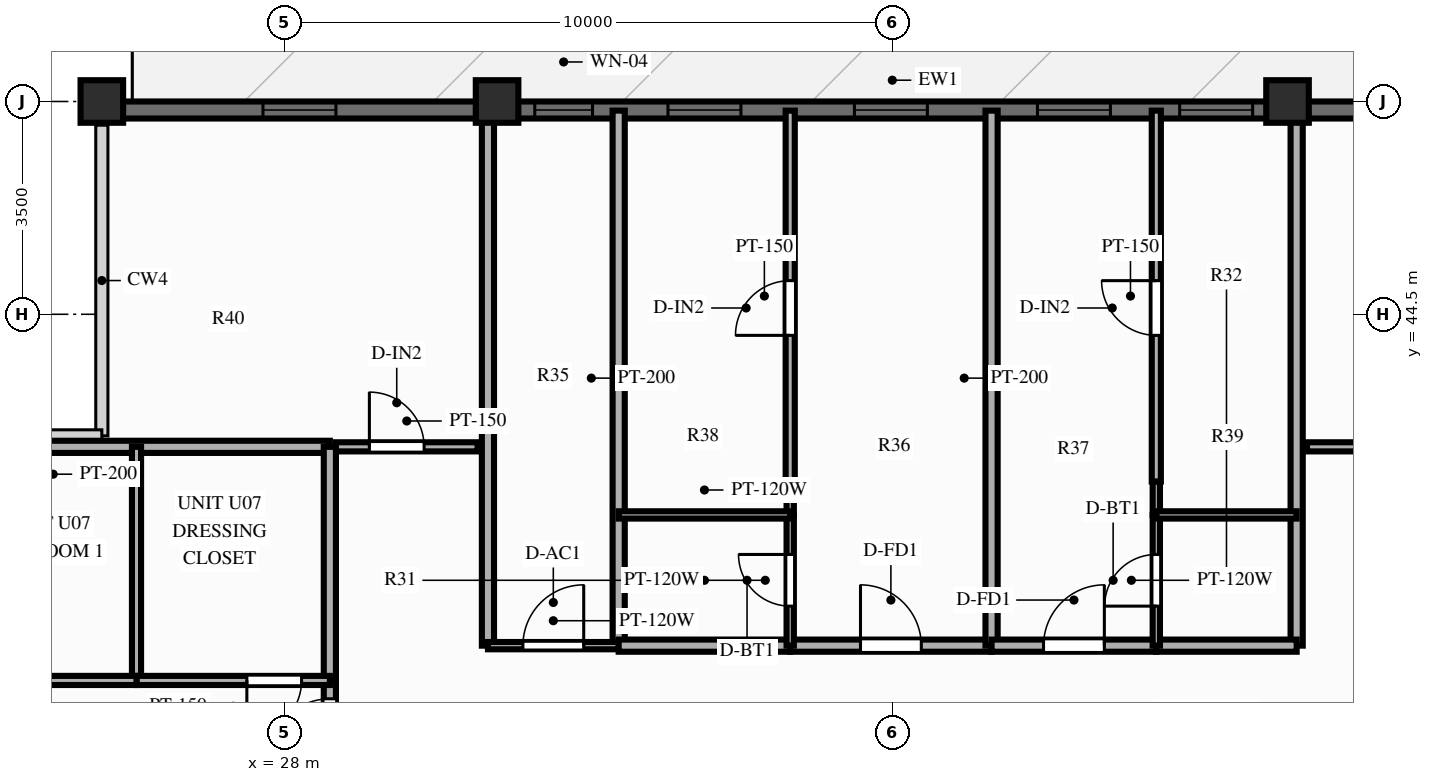
"""IFC4 building model, lengths in metres.
Left out: names, types, materials, properties, quantities, classifications, styles, units other than length and angle.
Written with IfcOpenShell. Run it as: python <this file> out.ifc"""

import sys

from ifc_helpers import new_model, si_unit, direction, frame, frame_2d, origin, origin_2d, place, context, subcontext, project, spatial, rectangle, extrude, source, transform, mapped, element, fill, save


model = new_model("IFC4")
c1 = context("Model", 3, precision=1e-05, world=origin(), true_north=direction((0.0, 1.0)))
c2 = subcontext(c1, "Body", "Model", "MODEL_VIEW")
j1 = project(units=[si_unit("LENGTHUNIT", "METRE"), si_unit("PLANEANGLEUNIT", "RADIAN")], contexts=[c1])
p1 = place(None, origin())
s1 = spatial("IfcSite", under=j1, at=p1, CompositionType="ELEMENT")
p2 = place(p1, origin())
s2 = spatial("IfcBuilding", under=s1, at=p2, CompositionType="ELEMENT")
p3 = place(p2, frame((0.0, 0.0, 216.3)))
s3 = spatial("IfcBuildingStorey", under=s2, at=p3, CompositionType="ELEMENT", Elevation=216.3)
m1 = source(origin(), c2, "Body", "SweptSolid", [
    extrude(rectangle(XDim=0.7, YDim=0.7, at=origin_2d()), origin(), (0.0, 0.0, 1.0), 3.9),
])
for number, where, z_axis, x_axis in (
    (1, (44.5, 48.0, 0.0), (0.0, 0.0, 1.0), (1.0, 0.0, 0.0)),
    (2, (31.5, 48.0, 0.0), (0.0, 0.0, 1.0), (1.0, 0.0, 0.0)),
    (3, (25.0, 48.0, 0.0), (0.0, 0.0, 1.0), (1.0, 0.0, 0.0)),
):
    element("IfcColumn", number, at=place(p3, frame(where, z_axis=z_axis, x_axis=x_axis)), inside=s3, PredefinedType="COLUMN", context=c2, shape_type="MappedRepresentation", body=[
        mapped(m1, transform((0.0, 0.0, 0.0), scale=1.0)),
    ])
p4 = place(p3, frame((25.0, 47.86, 0.0), z_axis=(0.0, 0.0, 1.0), x_axis=(1.0, 0.0, 0.0)))
e4 = element("IfcWall", 4, at=p4, inside=s3, PredefinedType="SOLIDWALL", context=c2, shape_type="SweptSolid", body=[
    extrude(rectangle(XDim=26.0, YDim=0.28, at=frame_2d((13.0, 0.0))), origin(), (0.0, 0.0, 1.0), 2.44),
])
p5 = place(p4, frame((2.65, 0.0, 0.25)))
e5 = element("IfcOpeningElement", 5, at=p5, cuts=e4, PredefinedType="OPENING", context=c2, shape_type="SweptSolid", body=[
    extrude(rectangle(XDim=1.2, YDim=1.5, at=frame_2d((0.6, 0.75))), frame((0.0, 0.152, 0.0), z_axis=(0.0, -1.0, 0.0), x_axis=(1.0, 0.0, 0.0)), (0.0, 0.0, 1.0), 0.304),
])
p6 = place(p4, frame((7.12, 0.0, 0.25)))
e6 = element("IfcOpeningElement", 6, at=p6, cuts=e4, PredefinedType="OPENING", context=c2, shape_type="SweptSolid", body=[
    extrude(rectangle(XDim=0.95, YDim=1.5, at=frame_2d((0.475, 0.75))), frame((0.0, 0.152, 0.0), z_axis=(0.0, -1.0, 0.0), x_axis=(1.0, 0.0, 0.0)), (0.0, 0.0, 1.0), 0.304),
])
p7 = place(p4, frame((9.311, 0.0, 0.25)))
e7 = element("IfcOpeningElement", 7, at=p7, cuts=e4, PredefinedType="OPENING", context=c2, shape_type="SweptSolid", body=[
    extrude(rectangle(XDim=1.2, YDim=1.5, at=frame_2d((0.6, 0.75))), frame((0.0, 0.152, 0.0), z_axis=(0.0, -1.0, 0.0), x_axis=(1.0, 0.0, 0.0)), (0.0, 0.0, 1.0), 0.304),
])
p8 = place(p4, frame((12.377, 0.0, 0.25)))
e8 = element("IfcOpeningElement", 8, at=p8, cuts=e4, PredefinedType="OPENING", context=c2, shape_type="SweptSolid", body=[
    extrude(rectangle(XDim=1.2, YDim=1.5, at=frame_2d((0.6, 0.75))), frame((0.0, 0.152, 0.0), z_axis=(0.0, -1.0, 0.0), x_axis=(1.0, 0.0, 0.0)), (0.0, 0.0, 1.0), 0.304),
])
p9 = place(p4, frame((15.387, 0.0, 0.25)))
e9 = element("IfcOpeningElement", 9, at=p9, cuts=e4, PredefinedType="OPENING", context=c2, shape_type="SweptSolid", body=[
    extrude(rectangle(XDim=1.2, YDim=1.5, at=frame_2d((0.6, 0.75))), frame((0.0, 0.152, 0.0), z_axis=(0.0, -1.0, 0.0), x_axis=(1.0, 0.0, 0.0)), (0.0, 0.0, 1.0), 0.304),
])
p10 = place(p4, frame((17.726, 0.0, 0.25)))
e10 = element("IfcOpeningElement", 10, at=p10, cuts=e4, PredefinedType="OPENING", context=c2, shape_type="SweptSolid", body=[
    extrude(rectangle(XDim=1.2, YDim=1.5, at=frame_2d((0.6, 0.75))), frame((0.0, 0.152, 0.0), z_axis=(0.0, -1.0, 0.0), x_axis=(1.0, 0.0, 0.0)), (0.0, 0.0, 1.0), 0.304),
])
p11 = place(p4, frame((22.2, 0.0, 0.0)))
e11 = element("IfcOpeningElement", 11, at=p11, cuts=e4, PredefinedType="OPENING", context=c2, shape_type="SweptSolid", body=[
    extrude(rectangle(XDim=1.1, YDim=2.15, at=frame_2d((0.55, 1.075))), frame((0.0, 0.152, 0.0), z_axis=(0.0, -1.0, 0.0), x_axis=(1.0, 0.0, 0.0)), (0.0, 0.0, 1.0), 0.304),
])
p12 = place(p3, frame((28.85, 42.32, 0.0), z_axis=(0.0, 0.0, 1.0), x_axis=(1.0, 0.0, 0.0)))
e12 = element("IfcWall", 12, at=p12, inside=s3, PredefinedType="PARTITIONING", context=c2, shape_type="SweptSolid", body=[
    extrude(rectangle(XDim=2.33, YDim=0.15, at=frame_2d((1.165, 0.0))), origin(), (0.0, 0.0, 1.0), 2.24),
])
p13 = place(p12, frame((0.55, 0.0, 0.0)))
e13 = element("IfcOpeningElement", 13, at=p13, cuts=e12, PredefinedType="OPENING", context=c2, shape_type="SweptSolid", body=[
    extrude(rectangle(XDim=0.9, YDim=2.1, at=frame_2d((0.45, 1.05))), frame((0.0, 0.087, 0.0), z_axis=(0.0, -1.0, 0.0), x_axis=(1.0, 0.0, 0.0)), (0.0, 0.0, 1.0), 0.174),
])
p14 = place(p3, frame((44.82, 42.32, 0.0), z_axis=(0.0, 0.0, 1.0), x_axis=(1.0, 0.0, 0.0)))
e14 = element("IfcWall", 14, at=p14, inside=s3, PredefinedType="PARTITIONING", context=c2, shape_type="SweptSolid", body=[
    extrude(rectangle(XDim=2.33, YDim=0.15, at=frame_2d((1.165, 0.0))), origin(), (0.0, 0.0, 1.0), 2.24),
])
p15 = place(p14, frame((0.88, 0.0, 0.0)))
e15 = element("IfcOpeningElement", 15, at=p15, cuts=e14, PredefinedType="OPENING", context=c2, shape_type="SweptSolid", body=[
    extrude(rectangle(XDim=0.9, YDim=2.1, at=frame_2d((0.45, 1.05))), frame((0.0, 0.087, 0.0), z_axis=(0.0, -1.0, 0.0), x_axis=(1.0, 0.0, 0.0)), (0.0, 0.0, 1.0), 0.174),
])
for number, where, z_axis, x_axis in (
    (16, (31.35, 39.05, 0.0), (0.0, 0.0, 1.0), (0.0, 1.0, 0.0)),
    (17, (44.65, 39.05, 0.0), (0.0, 0.0, 1.0), (0.0, 1.0, 0.0)),
):
    element("IfcWall", number, at=place(p3, frame(where, z_axis=z_axis, x_axis=x_axis)), inside=s3, PredefinedType="PARTITIONING", context=c2, shape_type="SweptSolid", body=[
        extrude(rectangle(XDim=8.8, YDim=0.2, at=frame_2d((4.4, 0.0))), origin(), (0.0, 0.0, 1.0), 2.44),
    ])
p16 = place(p3, frame((33.5, 39.05, 0.0), z_axis=(0.0, 0.0, 1.0), x_axis=(0.0, 1.0, 0.0)))
e18 = element("IfcWall", 18, at=p16, inside=s3, PredefinedType="PARTITIONING", context=c2, shape_type="SweptSolid", body=[
    extrude(rectangle(XDim=8.8, YDim=0.2, at=frame_2d((4.4, 0.0))), origin(), (0.0, 0.0, 1.0), 3.56),
])
p17 = place(p3, frame((31.35, 39.05, 0.0), z_axis=(0.0, 0.0, 1.0), x_axis=(1.0, 0.0, 0.0)))
e19 = element("IfcWall", 19, at=p17, inside=s3, PredefinedType="PARTITIONING", context=c2, shape_type="SweptSolid", body=[
    extrude(rectangle(XDim=2.15, YDim=0.12, at=frame_2d((1.075, 0.0))), origin(), (0.0, 0.0, 1.0), 3.56),
])
p18 = place(p17, frame((0.575, 0.0, 0.0)))
e20 = element("IfcOpeningElement", 20, at=p18, cuts=e19, PredefinedType="OPENING", context=c2, shape_type="SweptSolid", body=[
    extrude(rectangle(XDim=1.0, YDim=2.1, at=frame_2d((0.5, 1.05))), frame((0.0, 0.072, 0.0), z_axis=(0.0, -1.0, 0.0), x_axis=(1.0, 0.0, 0.0)), (0.0, 0.0, 1.0), 0.144),
])
p19 = place(p3, frame((33.5, 39.05, 0.0), z_axis=(0.0, 0.0, 1.0), x_axis=(1.0, 0.0, 0.0)))
e21 = element("IfcWall", 21, at=p19, inside=s3, PredefinedType="PARTITIONING", context=c2, shape_type="SweptSolid", body=[
    extrude(rectangle(XDim=2.821, YDim=0.2, at=frame_2d((1.411, 0.0))), origin(), (0.0, 0.0, 1.0), 3.56),
])
p20 = place(p3, frame((36.321, 39.05, 0.0), z_axis=(0.0, 0.0, 1.0), x_axis=(1.0, 0.0, 0.0)))
e22 = element("IfcWall", 22, at=p20, inside=s3, PredefinedType="PARTITIONING", context=c2, shape_type="SweptSolid", body=[
    extrude(rectangle(XDim=3.312, YDim=0.2, at=frame_2d((1.656, 0.0))), origin(), (0.0, 0.0, 1.0), 3.56),
])
p21 = place(p20, frame((1.156, 0.0, 0.0)))
e23 = element("IfcOpeningElement", 23, at=p21, cuts=e22, PredefinedType="OPENING", context=c2, shape_type="SweptSolid", body=[
    extrude(rectangle(XDim=1.0, YDim=2.15, at=frame_2d((0.5, 1.075))), frame((0.0, 0.112, 0.0), z_axis=(0.0, -1.0, 0.0), x_axis=(1.0, 0.0, 0.0)), (0.0, 0.0, 1.0), 0.224),
])
p22 = place(p3, frame((36.321, 39.05, 0.0), z_axis=(0.0, 0.0, 1.0), x_axis=(0.0, 1.0, 0.0)))
e24 = element("IfcWall", 24, at=p22, inside=s3, PredefinedType="PARTITIONING", context=c2, shape_type="SweptSolid", body=[
    extrude(rectangle(XDim=2.15, YDim=0.12, at=frame_2d((1.075, 0.0))), origin(), (0.0, 0.0, 1.0), 3.56),
])
p23 = place(p22, frame((0.65, 0.0, 0.0)))
e25 = element("IfcOpeningElement", 25, at=p23, cuts=e24, PredefinedType="OPENING", context=c2, shape_type="SweptSolid", body=[
    extrude(rectangle(XDim=0.85, YDim=2.05, at=frame_2d((0.425, 1.025))), frame((0.0, 0.072, 0.0), z_axis=(0.0, -1.0, 0.0), x_axis=(1.0, 0.0, 0.0)), (0.0, 0.0, 1.0), 0.144),
])
p24 = place(p3, frame((36.321, 41.2, 0.0), z_axis=(0.0, 0.0, 1.0), x_axis=(0.0, 1.0, 0.0)))
e26 = element("IfcWall", 26, at=p24, inside=s3, PredefinedType="PARTITIONING", context=c2, shape_type="SweptSolid", body=[
    extrude(rectangle(XDim=0.55, YDim=0.12, at=frame_2d((0.275, 0.0))), origin(), (0.0, 0.0, 1.0), 3.56),
])
p25 = place(p3, frame((33.5, 41.2, 0.0), z_axis=(0.0, 0.0, 1.0), x_axis=(1.0, 0.0, 0.0)))
e27 = element("IfcWall", 27, at=p25, inside=s3, PredefinedType="PARTITIONING", context=c2, shape_type="SweptSolid", body=[
    extrude(rectangle(XDim=2.821, YDim=0.12, at=frame_2d((1.411, 0.0))), origin(), (0.0, 0.0, 1.0), 3.56),
])
p26 = place(p3, frame((36.321, 41.75, 0.0), z_axis=(0.0, 0.0, 1.0), x_axis=(0.0, 1.0, 0.0)))
e28 = element("IfcWall", 28, at=p26, inside=s3, PredefinedType="PARTITIONING", context=c2, shape_type="SweptSolid", body=[
    extrude(rectangle(XDim=6.1, YDim=0.15, at=frame_2d((3.05, 0.0))), origin(), (0.0, 0.0, 1.0), 3.56),
])
p27 = place(p26, frame((2.403, 0.0, 0.0)))
e29 = element("IfcOpeningElement", 29, at=p27, cuts=e28, PredefinedType="OPENING", context=c2, shape_type="SweptSolid", body=[
    extrude(rectangle(XDim=0.9, YDim=2.1, at=frame_2d((0.45, 1.05))), frame((0.0, 0.087, 0.0), z_axis=(0.0, -1.0, 0.0), x_axis=(1.0, 0.0, 0.0)), (0.0, 0.0, 1.0), 0.174),
])
p28 = place(p3, frame((39.633, 39.05, 0.0), z_axis=(0.0, 0.0, 1.0), x_axis=(0.0, 1.0, 0.0)))
e30 = element("IfcWall", 30, at=p28, inside=s3, PredefinedType="PARTITIONING", context=c2, shape_type="SweptSolid", body=[
    extrude(rectangle(XDim=8.8, YDim=0.2, at=frame_2d((4.4, 0.0))), origin(), (0.0, 0.0, 1.0), 3.56),
])
p29 = place(p3, frame((39.633, 39.05, 0.0), z_axis=(0.0, 0.0, 1.0), x_axis=(1.0, 0.0, 0.0)))
e31 = element("IfcWall", 31, at=p29, inside=s3, PredefinedType="PARTITIONING", context=c2, shape_type="SweptSolid", body=[
    extrude(rectangle(XDim=2.709, YDim=0.2, at=frame_2d((1.354, 0.0))), origin(), (0.0, 0.0, 1.0), 3.56),
])
p30 = place(p29, frame((0.855, 0.0, 0.0)))
e32 = element("IfcOpeningElement", 32, at=p30, cuts=e31, PredefinedType="OPENING", context=c2, shape_type="SweptSolid", body=[
    extrude(rectangle(XDim=1.0, YDim=2.15, at=frame_2d((0.5, 1.075))), frame((0.0, 0.112, 0.0), z_axis=(0.0, -1.0, 0.0), x_axis=(1.0, 0.0, 0.0)), (0.0, 0.0, 1.0), 0.224),
])
p31 = place(p3, frame((42.342, 39.05, 0.0), z_axis=(0.0, 0.0, 1.0), x_axis=(1.0, 0.0, 0.0)))
e33 = element("IfcWall", 33, at=p31, inside=s3, PredefinedType="PARTITIONING", context=c2, shape_type="SweptSolid", body=[
    extrude(rectangle(XDim=2.308, YDim=0.2, at=frame_2d((1.154, 0.0))), origin(), (0.0, 0.0, 1.0), 3.56),
])
p32 = place(p3, frame((42.342, 39.05, 0.0), z_axis=(0.0, 0.0, 1.0), x_axis=(0.0, 1.0, 0.0)))
e34 = element("IfcWall", 34, at=p32, inside=s3, PredefinedType="PARTITIONING", context=c2, shape_type="SweptSolid", body=[
    extrude(rectangle(XDim=2.15, YDim=0.12, at=frame_2d((1.075, 0.0))), origin(), (0.0, 0.0, 1.0), 3.56),
])
p33 = place(p32, frame((0.65, 0.0, 0.0)))
e35 = element("IfcOpeningElement", 35, at=p33, cuts=e34, PredefinedType="OPENING", context=c2, shape_type="SweptSolid", body=[
    extrude(rectangle(XDim=0.85, YDim=2.05, at=frame_2d((0.425, 1.025))), frame((0.0, 0.072, 0.0), z_axis=(0.0, -1.0, 0.0), x_axis=(1.0, 0.0, 0.0)), (0.0, 0.0, 1.0), 0.144),
])
p34 = place(p3, frame((42.342, 41.2, 0.0), z_axis=(0.0, 0.0, 1.0), x_axis=(0.0, 1.0, 0.0)))
e36 = element("IfcWall", 36, at=p34, inside=s3, PredefinedType="PARTITIONING", context=c2, shape_type="SweptSolid", body=[
    extrude(rectangle(XDim=0.55, YDim=0.12, at=frame_2d((0.275, 0.0))), origin(), (0.0, 0.0, 1.0), 3.56),
])
p35 = place(p3, frame((42.342, 41.2, 0.0), z_axis=(0.0, 0.0, 1.0), x_axis=(1.0, 0.0, 0.0)))
e37 = element("IfcWall", 37, at=p35, inside=s3, PredefinedType="PARTITIONING", context=c2, shape_type="SweptSolid", body=[
    extrude(rectangle(XDim=2.308, YDim=0.12, at=frame_2d((1.154, 0.0))), origin(), (0.0, 0.0, 1.0), 3.56),
])
p36 = place(p3, frame((42.342, 41.75, 0.0), z_axis=(0.0, 0.0, 1.0), x_axis=(0.0, 1.0, 0.0)))
e38 = element("IfcWall", 38, at=p36, inside=s3, PredefinedType="PARTITIONING", context=c2, shape_type="SweptSolid", body=[
    extrude(rectangle(XDim=6.1, YDim=0.15, at=frame_2d((3.05, 0.0))), origin(), (0.0, 0.0, 1.0), 3.56),
])
p37 = place(p36, frame((2.403, 0.0, 0.0)))
e39 = element("IfcOpeningElement", 39, at=p37, cuts=e38, PredefinedType="OPENING", context=c2, shape_type="SweptSolid", body=[
    extrude(rectangle(XDim=0.9, YDim=2.1, at=frame_2d((0.45, 1.05))), frame((0.0, 0.087, 0.0), z_axis=(0.0, -1.0, 0.0), x_axis=(1.0, 0.0, 0.0)), (0.0, 0.0, 1.0), 0.174),
])
p38 = place(p3, frame((28.75, 42.32, 0.0), z_axis=(0.0, 0.0, 1.0), x_axis=(-1.0, 0.0, 0.0)))
e40 = element("IfcWall", 40, at=p38, inside=s3, PredefinedType="PARTITIONING", context=c2, shape_type="SweptSolid", body=[
    extrude(rectangle(XDim=9.1, YDim=0.2, at=frame_2d((4.55, 0.0))), origin(), (0.0, 0.0, 1.0), 2.24),
])
p39 = place(p3, frame((28.75, 34.959, 0.0), z_axis=(0.0, 0.0, 1.0), x_axis=(0.0, 1.0, 0.0)))
e41 = element("IfcWall", 41, at=p39, inside=s3, PredefinedType="PARTITIONING", context=c2, shape_type="SweptSolid", body=[
    extrude(rectangle(XDim=3.519, YDim=0.2, at=frame_2d((1.76, 0.0))), origin(), (0.0, 0.0, 1.0), 3.56),
])
p40 = place(p39, frame((2.217, 0.0, 0.0)))
e42 = element("IfcOpeningElement", 42, at=p40, cuts=e41, PredefinedType="OPENING", context=c2, shape_type="SweptSolid", body=[
    extrude(rectangle(XDim=1.0, YDim=2.15, at=frame_2d((0.5, 1.075))), frame((0.0, 0.112, 0.0), z_axis=(0.0, -1.0, 0.0), x_axis=(1.0, 0.0, 0.0)), (0.0, 0.0, 1.0), 0.224),
])
p41 = place(p3, frame((28.75, 38.478, 0.0), z_axis=(0.0, 0.0, 1.0), x_axis=(0.0, 1.0, 0.0)))
e43 = element("IfcWall", 43, at=p41, inside=s3, PredefinedType="PARTITIONING", context=c2, shape_type="SweptSolid", body=[
    extrude(rectangle(XDim=3.842, YDim=0.2, at=frame_2d((1.921, 0.0))), origin(), (0.0, 0.0, 1.0), 3.56),
])
p42 = place(p3, frame((25.57, 38.478, 0.0), z_axis=(0.0, 0.0, 1.0), x_axis=(0.0, 1.0, 0.0)))
e44 = element("IfcWall", 44, at=p42, inside=s3, PredefinedType="PARTITIONING", context=c2, shape_type="SweptSolid", body=[
    extrude(rectangle(XDim=3.842, YDim=0.15, at=frame_2d((1.921, 0.0))), origin(), (0.0, 0.0, 1.0), 3.56),
])
p43 = place(p3, frame((28.75, 38.478, 0.0), z_axis=(0.0, 0.0, 1.0), x_axis=(-1.0, 0.0, 0.0)))
e45 = element("IfcWall", 45, at=p43, inside=s3, PredefinedType="PARTITIONING", context=c2, shape_type="SweptSolid", body=[
    extrude(rectangle(XDim=3.18, YDim=0.15, at=frame_2d((1.59, 0.0))), origin(), (0.0, 0.0, 1.0), 3.56),
])
p44 = place(p43, frame((0.465, 0.0, 0.0)))
e46 = element("IfcOpeningElement", 46, at=p44, cuts=e45, PredefinedType="OPENING", context=c2, shape_type="SweptSolid", body=[
    extrude(rectangle(XDim=0.9, YDim=2.1, at=frame_2d((0.45, 1.05))), frame((0.0, 0.087, 0.0), z_axis=(0.0, -1.0, 0.0), x_axis=(1.0, 0.0, 0.0)), (0.0, 0.0, 1.0), 0.174),
])
p45 = place(p3, frame((25.57, 38.478, 0.0), z_axis=(0.0, 0.0, 1.0), x_axis=(-1.0, 0.0, 0.0)))
e47 = element("IfcWall", 47, at=p45, inside=s3, PredefinedType="PARTITIONING", context=c2, shape_type="SweptSolid", body=[
    extrude(rectangle(XDim=5.92, YDim=0.15, at=frame_2d((2.96, 0.0))), origin(), (0.0, 0.0, 1.0), 3.56),
])
p46 = place(p45, frame((2.321, 0.0, 0.0)))
e48 = element("IfcOpeningElement", 48, at=p46, cuts=e47, PredefinedType="OPENING", context=c2, shape_type="SweptSolid", body=[
    extrude(rectangle(XDim=0.9, YDim=2.1, at=frame_2d((0.45, 1.05))), frame((0.0, 0.087, 0.0), z_axis=(0.0, -1.0, 0.0), x_axis=(1.0, 0.0, 0.0)), (0.0, 0.0, 1.0), 0.174),
])
m2 = source(origin(), c2, "Body", "SweptSolid", [
    extrude(rectangle(XDim=1.2, YDim=1.5, at=frame_2d((0.6, 0.75))), frame((0.0, 0.03, 0.0), z_axis=(0.0, -1.0, 0.0), x_axis=(1.0, 0.0, 0.0)), (0.0, 0.0, 1.0), 0.06),
])
p47 = place(p5, origin())
e49 = element("IfcWindow", 49, at=p47, inside=s3, PartitioningType="SINGLE_PANEL", PredefinedType="WINDOW", context=c2, shape_type="MappedRepresentation", body=[
    mapped(m2, transform((0.0, 0.0, 0.0), scale=1.0)),
])
fill(e5, e49)
m3 = source(origin(), c2, "Body", "SweptSolid", [
    extrude(rectangle(XDim=0.95, YDim=1.5, at=frame_2d((0.475, 0.75))), frame((0.0, 0.03, 0.0), z_axis=(0.0, -1.0, 0.0), x_axis=(1.0, 0.0, 0.0)), (0.0, 0.0, 1.0), 0.06),
])
p48 = place(p6, origin())
e50 = element("IfcWindow", 50, at=p48, inside=s3, PartitioningType="SINGLE_PANEL", PredefinedType="WINDOW", context=c2, shape_type="MappedRepresentation", body=[
    mapped(m3, transform((0.0, 0.0, 0.0), scale=1.0)),
])
fill(e6, e50)
p49 = place(p7, origin())
e51 = element("IfcWindow", 51, at=p49, inside=s3, PartitioningType="SINGLE_PANEL", PredefinedType="WINDOW", context=c2, shape_type="MappedRepresentation", body=[
    mapped(m2, transform((0.0, 0.0, 0.0), scale=1.0)),
])
fill(e7, e51)
p50 = place(p8, origin())
e52 = element("IfcWindow", 52, at=p50, inside=s3, PartitioningType="SINGLE_PANEL", PredefinedType="WINDOW", context=c2, shape_type="MappedRepresentation", body=[
    mapped(m2, transform((0.0, 0.0, 0.0), scale=1.0)),
])
fill(e8, e52)
p51 = place(p9, origin())
e53 = element("IfcWindow", 53, at=p51, inside=s3, PartitioningType="SINGLE_PANEL", PredefinedType="WINDOW", context=c2, shape_type="MappedRepresentation", body=[
    mapped(m2, transform((0.0, 0.0, 0.0), scale=1.0)),
])
fill(e9, e53)
p52 = place(p10, origin())
e54 = element("IfcWindow", 54, at=p52, inside=s3, PartitioningType="SINGLE_PANEL", PredefinedType="WINDOW", context=c2, shape_type="MappedRepresentation", body=[
    mapped(m2, transform((0.0, 0.0, 0.0), scale=1.0)),
])
fill(e10, e54)
m4 = source(origin(), c2, "Body", "SweptSolid", [
    extrude(rectangle(XDim=0.9, YDim=2.1, at=frame_2d((0.45, 1.05))), frame((0.0, 0.025, 0.0), z_axis=(0.0, -1.0, 0.0), x_axis=(1.0, 0.0, 0.0)), (0.0, 0.0, 1.0), 0.05),
])
p53 = place(p13, origin())
e55 = element("IfcDoor", 55, at=p53, inside=s3, OperationType="SINGLE_SWING_LEFT", PredefinedType="DOOR", context=c2, shape_type="MappedRepresentation", body=[
    mapped(m4, transform((0.0, 0.0, 0.0), scale=1.0)),
])
fill(e13, e55)
m5 = source(origin(), c2, "Body", "SweptSolid", [
    extrude(rectangle(XDim=1.0, YDim=2.1, at=frame_2d((0.5, 1.05))), frame((0.0, 0.025, 0.0), z_axis=(0.0, -1.0, 0.0), x_axis=(1.0, 0.0, 0.0)), (0.0, 0.0, 1.0), 0.05),
])
p54 = place(p18, origin())
e56 = element("IfcDoor", 56, at=p54, inside=s3, OperationType="SINGLE_SWING_RIGHT", PredefinedType="DOOR", context=c2, shape_type="MappedRepresentation", body=[
    mapped(m5, transform((0.0, 0.0, 0.0), scale=1.0)),
])
fill(e20, e56)
m6 = source(origin(), c2, "Body", "SweptSolid", [
    extrude(rectangle(XDim=1.0, YDim=2.15, at=frame_2d((0.5, 1.075))), frame((0.0, 0.025, 0.0), z_axis=(0.0, -1.0, 0.0), x_axis=(1.0, 0.0, 0.0)), (0.0, 0.0, 1.0), 0.05),
])
p55 = place(p21, origin())
e57 = element("IfcDoor", 57, at=p55, inside=s3, OperationType="SINGLE_SWING_LEFT", PredefinedType="DOOR", context=c2, shape_type="MappedRepresentation", body=[
    mapped(m6, transform((0.0, 0.0, 0.0), scale=1.0)),
])
fill(e23, e57)
m7 = source(origin(), c2, "Body", "SweptSolid", [
    extrude(rectangle(XDim=0.85, YDim=2.05, at=frame_2d((0.425, 1.025))), frame((0.0, 0.025, 0.0), z_axis=(0.0, -1.0, 0.0), x_axis=(1.0, 0.0, 0.0)), (0.0, 0.0, 1.0), 0.05),
])
p56 = place(p23, origin())
e58 = element("IfcDoor", 58, at=p56, inside=s3, OperationType="SINGLE_SWING_RIGHT", PredefinedType="DOOR", context=c2, shape_type="MappedRepresentation", body=[
    mapped(m7, transform((0.0, 0.0, 0.0), scale=1.0)),
])
fill(e25, e58)
p57 = place(p27, origin())
e59 = element("IfcDoor", 59, at=p57, inside=s3, OperationType="SINGLE_SWING_LEFT", PredefinedType="DOOR", context=c2, shape_type="MappedRepresentation", body=[
    mapped(m4, transform((0.0, 0.0, 0.0), scale=1.0)),
])
fill(e29, e59)
p58 = place(p30, origin())
e60 = element("IfcDoor", 60, at=p58, inside=s3, OperationType="SINGLE_SWING_RIGHT", PredefinedType="DOOR", context=c2, shape_type="MappedRepresentation", body=[
    mapped(m6, transform((0.0, 0.0, 0.0), scale=1.0)),
])
fill(e32, e60)
p59 = place(p33, origin())
e61 = element("IfcDoor", 61, at=p59, inside=s3, OperationType="SINGLE_SWING_LEFT", PredefinedType="DOOR", context=c2, shape_type="MappedRepresentation", body=[
    mapped(m7, transform((0.0, 0.0, 0.0), scale=1.0)),
])
fill(e35, e61)
p60 = place(p37, origin())
e62 = element("IfcDoor", 62, at=p60, inside=s3, OperationType="SINGLE_SWING_RIGHT", PredefinedType="DOOR", context=c2, shape_type="MappedRepresentation", body=[
    mapped(m4, transform((0.0, 0.0, 0.0), scale=1.0)),
])
fill(e39, e62)
p61 = place(p40, origin())
e63 = element("IfcDoor", 63, at=p61, inside=s3, OperationType="SINGLE_SWING_LEFT", PredefinedType="DOOR", context=c2, shape_type="MappedRepresentation", body=[
    mapped(m6, transform((0.0, 0.0, 0.0), scale=1.0)),
])
fill(e42, e63)
p62 = place(p44, origin())
e64 = element("IfcDoor", 64, at=p62, inside=s3, OperationType="SINGLE_SWING_RIGHT", PredefinedType="DOOR", context=c2, shape_type="MappedRepresentation", body=[
    mapped(m4, transform((0.0, 0.0, 0.0), scale=1.0)),
])
fill(e46, e64)
save(model, sys.argv[1])
